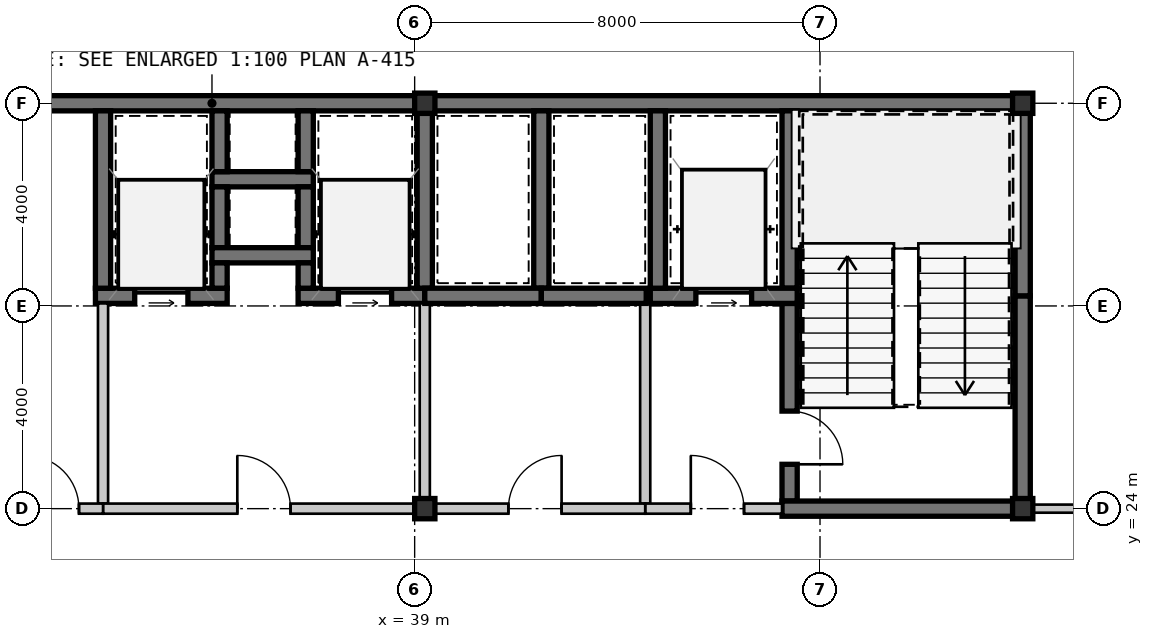
"""IFC4 building model, lengths in metres.
Left out: names, types, materials, properties, quantities, classifications, styles, units other than length and angle.
Written with IfcOpenShell. Run it as: python <this file> out.ifc"""

import sys

from ifc_helpers import new_model, si_unit, direction, frame, frame_2d, origin, origin_2d, place, context, subcontext, project, spatial, rectangle, hollow_rectangle, extrude, source, transform, mapped, element, fill, save


model = new_model("IFC4")
c1 = context("Model", 3, precision=1e-05, world=origin(), true_north=direction((0.0, 1.0)))
c2 = subcontext(c1, "Body", "Model", "MODEL_VIEW")
j1 = project(units=[si_unit("LENGTHUNIT", "METRE"), si_unit("PLANEANGLEUNIT", "RADIAN")], contexts=[c1])
p1 = place(None, origin())
s1 = spatial("IfcSite", under=j1, at=p1, CompositionType="ELEMENT")
p2 = place(p1, origin())
s2 = spatial("IfcBuilding", under=s1, at=p2, CompositionType="ELEMENT")
p3 = place(p2, frame((0.0, 0.0, 133.0)))
s3 = spatial("IfcBuildingStorey", under=s2, at=p3, CompositionType="ELEMENT", Elevation=133.0)
m1 = source(origin(), c2, "Body", "SweptSolid", [
    extrude(hollow_rectangle(XDim=0.4, YDim=0.4, WallThickness=0.016, at=origin_2d()), origin(), (0.0, 0.0, 1.0), 3.15),
])
for number, where, z_axis, x_axis in (
    (1, (39.2, 24.0, 0.0), (0.0, 0.0, 1.0), (1.0, 0.0, 0.0)),
    (2, (51.0, 24.0, 0.0), (0.0, 0.0, 1.0), (1.0, 0.0, 0.0)),
    (3, (39.2, 32.0, 0.0), (0.0, 0.0, 1.0), (1.0, 0.0, 0.0)),
    (4, (51.0, 32.0, 0.0), (0.0, 0.0, 1.0), (1.0, 0.0, 0.0)),
):
    element("IfcColumn", number, at=place(p3, frame(where, z_axis=z_axis, x_axis=x_axis)), inside=s3, PredefinedType="COLUMN", context=c2, shape_type="MappedRepresentation", body=[
        mapped(m1, transform((0.0, 0.0, 0.0), scale=1.0)),
    ])
m2 = source(origin(), c2, "Body", "SweptSolid", [
    extrude(rectangle(XDim=11.2, YDim=0.3, at=frame_2d((5.6, 0.0))), origin(), (0.0, 0.0, 1.0), 2.93),
])
p4 = place(p3, frame((28.0, 32.0, 0.0), z_axis=(0.0, 0.0, 1.0), x_axis=(1.0, 0.0, 0.0)))
e5 = element("IfcWall", 5, at=p4, inside=s3, PredefinedType="SHEAR", context=c2, shape_type="MappedRepresentation", body=[
    mapped(m2, transform((0.0, 0.0, 0.0), scale=1.0)),
])
m3 = source(origin(), c2, "Body", "SweptSolid", [
    extrude(rectangle(XDim=11.95, YDim=0.3, at=frame_2d((5.975, 0.0))), origin(), (0.0, 0.0, 1.0), 2.93),
])
p5 = place(p3, frame((39.2, 32.0, 0.0), z_axis=(0.0, 0.0, 1.0), x_axis=(1.0, 0.0, 0.0)))
e6 = element("IfcWall", 6, at=p5, inside=s3, PredefinedType="SHEAR", context=c2, shape_type="MappedRepresentation", body=[
    mapped(m3, transform((0.0, 0.0, 0.0), scale=1.0)),
])
m4 = source(origin(), c2, "Body", "SweptSolid", [
    extrude(rectangle(XDim=4.05, YDim=0.3, at=frame_2d((2.025, 0.0))), origin(), (0.0, 0.0, 1.0), 2.93),
])
p6 = place(p3, frame((51.0, 24.15, 0.0), z_axis=(0.0, 0.0, 1.0), x_axis=(0.0, 1.0, 0.0)))
e7 = element("IfcWall", 7, at=p6, inside=s3, PredefinedType="SHEAR", context=c2, shape_type="MappedRepresentation", body=[
    mapped(m4, transform((0.0, 0.0, 0.0), scale=1.0)),
])
m5 = source(origin(), c2, "Body", "SweptSolid", [
    extrude(rectangle(XDim=3.65, YDim=0.3, at=frame_2d((1.825, 0.0))), origin(), (0.0, 0.0, 1.0), 2.93),
])
p7 = place(p3, frame((51.0, 28.2, 0.0), z_axis=(0.0, 0.0, 1.0), x_axis=(0.0, 1.0, 0.0)))
e8 = element("IfcWall", 8, at=p7, inside=s3, PredefinedType="SHEAR", context=c2, shape_type="MappedRepresentation", body=[
    mapped(m5, transform((0.0, 0.0, 0.0), scale=1.0)),
])
m6 = source(origin(), c2, "Body", "SweptSolid", [
    extrude(rectangle(XDim=3.5, YDim=0.3, at=frame_2d((1.75, 0.0))), origin(), (0.0, 0.0, 1.0), 2.93),
])
p8 = place(p3, frame((46.4, 31.85, 0.0), z_axis=(0.0, 0.0, 1.0), x_axis=(0.0, -1.0, 0.0)))
e9 = element("IfcWall", 9, at=p8, inside=s3, PredefinedType="SHEAR", context=c2, shape_type="MappedRepresentation", body=[
    mapped(m6, transform((0.0, 0.0, 0.0), scale=1.0)),
])
m7 = source(origin(), c2, "Body", "SweptSolid", [
    extrude(rectangle(XDim=3.9, YDim=0.3, at=frame_2d((1.95, 0.0))), origin(), (0.0, 0.0, 1.0), 2.93),
])
p9 = place(p3, frame((46.4, 28.05, 0.0), z_axis=(0.0, 0.0, 1.0), x_axis=(0.0, -1.0, 0.0)))
e10 = element("IfcWall", 10, at=p9, inside=s3, PredefinedType="SHEAR", context=c2, shape_type="MappedRepresentation", body=[
    mapped(m7, transform((0.0, 0.0, 0.0), scale=1.0)),
])
m8 = source(origin(), c2, "Body", "SweptSolid", [
    extrude(rectangle(XDim=1.05, YDim=2.1, at=frame_2d((0.525, 1.05))), frame((0.0, 0.16, 0.0), z_axis=(0.0, -1.0, 0.0), x_axis=(1.0, 0.0, 0.0)), (0.0, 0.0, 1.0), 0.32),
])
p10 = place(p9, frame((2.125, 0.0, 0.0)))
e11 = element("IfcOpeningElement", 11, at=p10, cuts=e10, PredefinedType="OPENING", context=c2, shape_type="MappedRepresentation", body=[
    mapped(m8, transform((0.0, 0.0, 0.0), scale=1.0)),
])
m9 = source(origin(), c2, "Body", "SweptSolid", [
    extrude(rectangle(XDim=4.9, YDim=0.3, at=frame_2d((2.45, 0.0))), origin(), (0.0, 0.0, 1.0), 2.93),
])
p11 = place(p3, frame((46.25, 24.0, 0.0), z_axis=(0.0, 0.0, 1.0), x_axis=(1.0, 0.0, 0.0)))
e12 = element("IfcWall", 12, at=p11, inside=s3, PredefinedType="SHEAR", context=c2, shape_type="MappedRepresentation", body=[
    mapped(m9, transform((0.0, 0.0, 0.0), scale=1.0)),
])
m10 = source(origin(), c2, "Body", "SweptSolid", [
    extrude(rectangle(XDim=2.9, YDim=0.3, at=frame_2d((1.45, 0.0))), origin(), (0.0, 0.0, 1.0), 2.93),
])
p12 = place(p3, frame((43.65, 28.2, 0.0), z_axis=(0.0, 0.0, 1.0), x_axis=(1.0, 0.0, 0.0)))
e13 = element("IfcWall", 13, at=p12, inside=s3, PredefinedType="SHEAR", context=c2, shape_type="MappedRepresentation", body=[
    mapped(m10, transform((0.0, 0.0, 0.0), scale=1.0)),
])
m11 = source(origin(), c2, "Body", "SweptSolid", [
    extrude(rectangle(XDim=1.1, YDim=2.15, at=frame_2d((0.55, 1.075))), frame((0.0, 0.16, 0.0), z_axis=(0.0, -1.0, 0.0), x_axis=(1.0, 0.0, 0.0)), (0.0, 0.0, 1.0), 0.32),
])
p13 = place(p12, frame((0.9, 0.0, 0.0)))
e14 = element("IfcOpeningElement", 14, at=p13, cuts=e13, PredefinedType="OPENING", context=c2, shape_type="MappedRepresentation", body=[
    mapped(m11, transform((0.0, 0.0, 0.0), scale=1.0)),
])
p14 = place(p3, frame((43.8, 31.85, 0.0), z_axis=(0.0, 0.0, 1.0), x_axis=(0.0, -1.0, 0.0)))
e15 = element("IfcWall", 15, at=p14, inside=s3, PredefinedType="SHEAR", context=c2, shape_type="MappedRepresentation", body=[
    mapped(m6, transform((0.0, 0.0, 0.0), scale=1.0)),
])
m12 = source(origin(), c2, "Body", "SweptSolid", [
    extrude(rectangle(XDim=3.95, YDim=0.2, at=frame_2d((1.975, 0.0))), origin(), (0.0, 0.0, 1.0), 2.93),
])
p15 = place(p3, frame((43.55, 28.05, 0.0), z_axis=(0.0, 0.0, 1.0), x_axis=(0.0, -1.0, 0.0)))
e16 = element("IfcWall", 16, at=p15, inside=s3, PredefinedType="SOLIDWALL", context=c2, shape_type="MappedRepresentation", body=[
    mapped(m12, transform((0.0, 0.0, 0.0), scale=1.0)),
])
m13 = source(origin(), c2, "Body", "SweptSolid", [
    extrude(rectangle(XDim=2.7, YDim=0.2, at=frame_2d((1.35, 0.0))), origin(), (0.0, 0.0, 1.0), 2.397),
])
p16 = place(p3, frame((43.55, 24.0, 0.0), z_axis=(0.0, 0.0, 1.0), x_axis=(1.0, 0.0, 0.0)))
e17 = element("IfcWall", 17, at=p16, inside=s3, PredefinedType="SOLIDWALL", context=c2, shape_type="MappedRepresentation", body=[
    mapped(m13, transform((0.0, 0.0, 0.0), scale=1.0)),
])
m14 = source(origin(), c2, "Body", "SweptSolid", [
    extrude(rectangle(XDim=1.05, YDim=2.1, at=frame_2d((0.525, 1.05))), frame((0.0, 0.11, 0.0), z_axis=(0.0, -1.0, 0.0), x_axis=(1.0, 0.0, 0.0)), (0.0, 0.0, 1.0), 0.22),
])
p17 = place(p16, frame((0.9, 0.0, 0.0)))
e18 = element("IfcOpeningElement", 18, at=p17, cuts=e17, PredefinedType="OPENING", context=c2, shape_type="MappedRepresentation", body=[
    mapped(m14, transform((0.0, 0.0, 0.0), scale=1.0)),
])
m15 = source(origin(), c2, "Body", "SweptSolid", [
    extrude(rectangle(XDim=2.0, YDim=0.3, at=frame_2d((1.0, 0.0))), origin(), (0.0, 0.0, 1.0), 2.93),
])
p18 = place(p3, frame((35.0, 30.5, 0.0), z_axis=(0.0, 0.0, 1.0), x_axis=(1.0, 0.0, 0.0)))
e19 = element("IfcWall", 19, at=p18, inside=s3, PredefinedType="SHEAR", context=c2, shape_type="MappedRepresentation", body=[
    mapped(m15, transform((0.0, 0.0, 0.0), scale=1.0)),
])
m16 = source(origin(), c2, "Body", "SweptSolid", [
    extrude(rectangle(XDim=1.2, YDim=0.3, at=frame_2d((0.6, 0.0))), origin(), (0.0, 0.0, 1.0), 2.93),
])
for number, where, z_axis, x_axis in (
    (20, (35.15, 31.85, 0.0), (0.0, 0.0, 1.0), (0.0, -1.0, 0.0)),
    (21, (36.85, 30.65, 0.0), (0.0, 0.0, 1.0), (0.0, 1.0, 0.0)),
    (22, (35.15, 30.35, 0.0), (0.0, 0.0, 1.0), (0.0, -1.0, 0.0)),
    (23, (36.85, 29.15, 0.0), (0.0, 0.0, 1.0), (0.0, 1.0, 0.0)),
):
    element("IfcWall", number, at=place(p3, frame(where, z_axis=z_axis, x_axis=x_axis)), inside=s3, PredefinedType="SHEAR", context=c2, shape_type="MappedRepresentation", body=[
        mapped(m16, transform((0.0, 0.0, 0.0), scale=1.0)),
    ])
p19 = place(p3, frame((35.0, 29.0, 0.0), z_axis=(0.0, 0.0, 1.0), x_axis=(1.0, 0.0, 0.0)))
e24 = element("IfcWall", 24, at=p19, inside=s3, PredefinedType="SHEAR", context=c2, shape_type="MappedRepresentation", body=[
    mapped(m15, transform((0.0, 0.0, 0.0), scale=1.0)),
])
m17 = source(origin(), c2, "Body", "SweptSolid", [
    extrude(rectangle(XDim=2.6, YDim=0.3, at=frame_2d((1.3, 0.0))), origin(), (0.0, 0.0, 1.0), 2.93),
])
p20 = place(p3, frame((32.7, 28.2, 0.0), z_axis=(0.0, 0.0, 1.0), x_axis=(1.0, 0.0, 0.0)))
e25 = element("IfcWall", 25, at=p20, inside=s3, PredefinedType="SHEAR", context=c2, shape_type="MappedRepresentation", body=[
    mapped(m17, transform((0.0, 0.0, 0.0), scale=1.0)),
])
m18 = source(origin(), c2, "Body", "SweptSolid", [
    extrude(rectangle(XDim=1.05, YDim=2.15, at=frame_2d((0.525, 1.075))), frame((0.0, 0.16, 0.0), z_axis=(0.0, -1.0, 0.0), x_axis=(1.0, 0.0, 0.0)), (0.0, 0.0, 1.0), 0.32),
])
p21 = place(p20, frame((0.775, 0.0, 0.0)))
e26 = element("IfcOpeningElement", 26, at=p21, cuts=e25, PredefinedType="OPENING", context=c2, shape_type="MappedRepresentation", body=[
    mapped(m18, transform((0.0, 0.0, 0.0), scale=1.0)),
])
m19 = source(origin(), c2, "Body", "SweptSolid", [
    extrude(rectangle(XDim=0.5, YDim=0.3, at=frame_2d((0.25, 0.0))), origin(), (0.0, 0.0, 1.0), 2.93),
])
p22 = place(p3, frame((35.15, 28.35, 0.0), z_axis=(0.0, 0.0, 1.0), x_axis=(0.0, 1.0, 0.0)))
e27 = element("IfcWall", 27, at=p22, inside=s3, PredefinedType="SHEAR", context=c2, shape_type="MappedRepresentation", body=[
    mapped(m19, transform((0.0, 0.0, 0.0), scale=1.0)),
])
p23 = place(p3, frame((32.85, 31.85, 0.0), z_axis=(0.0, 0.0, 1.0), x_axis=(0.0, -1.0, 0.0)))
e28 = element("IfcWall", 28, at=p23, inside=s3, PredefinedType="SHEAR", context=c2, shape_type="MappedRepresentation", body=[
    mapped(m6, transform((0.0, 0.0, 0.0), scale=1.0)),
])
m20 = source(origin(), c2, "Body", "SweptSolid", [
    extrude(rectangle(XDim=2.5, YDim=0.3, at=frame_2d((1.25, 0.0))), origin(), (0.0, 0.0, 1.0), 2.93),
])
p24 = place(p3, frame((36.7, 28.2, 0.0), z_axis=(0.0, 0.0, 1.0), x_axis=(1.0, 0.0, 0.0)))
e29 = element("IfcWall", 29, at=p24, inside=s3, PredefinedType="SHEAR", context=c2, shape_type="MappedRepresentation", body=[
    mapped(m20, transform((0.0, 0.0, 0.0), scale=1.0)),
])
p25 = place(p24, frame((0.795, 0.0, 0.0)))
e30 = element("IfcOpeningElement", 30, at=p25, cuts=e29, PredefinedType="OPENING", context=c2, shape_type="MappedRepresentation", body=[
    mapped(m18, transform((0.0, 0.0, 0.0), scale=1.0)),
])
p26 = place(p3, frame((36.85, 28.85, 0.0), z_axis=(0.0, 0.0, 1.0), x_axis=(0.0, -1.0, 0.0)))
e31 = element("IfcWall", 31, at=p26, inside=s3, PredefinedType="SHEAR", context=c2, shape_type="MappedRepresentation", body=[
    mapped(m19, transform((0.0, 0.0, 0.0), scale=1.0)),
])
p27 = place(p3, frame((39.2, 28.35, 0.0), z_axis=(0.0, 0.0, 1.0), x_axis=(0.0, 1.0, 0.0)))
e32 = element("IfcWall", 32, at=p27, inside=s3, PredefinedType="SHEAR", context=c2, shape_type="MappedRepresentation", body=[
    mapped(m6, transform((0.0, 0.0, 0.0), scale=1.0)),
])
p28 = place(p3, frame((32.85, 24.1, 0.0), z_axis=(0.0, 0.0, 1.0), x_axis=(0.0, 1.0, 0.0)))
e33 = element("IfcWall", 33, at=p28, inside=s3, PredefinedType="SOLIDWALL", context=c2, shape_type="MappedRepresentation", body=[
    mapped(m12, transform((0.0, 0.0, 0.0), scale=1.0)),
])
m21 = source(origin(), c2, "Body", "SweptSolid", [
    extrude(rectangle(XDim=3.95, YDim=0.2, at=frame_2d((1.975, 0.0))), origin(), (0.0, 0.0, 1.0), 2.47),
])
p29 = place(p3, frame((39.2, 28.05, 0.0), z_axis=(0.0, 0.0, 1.0), x_axis=(0.0, -1.0, 0.0)))
e34 = element("IfcWall", 34, at=p29, inside=s3, PredefinedType="SOLIDWALL", context=c2, shape_type="MappedRepresentation", body=[
    mapped(m21, transform((0.0, 0.0, 0.0), scale=1.0)),
])
m22 = source(origin(), c2, "Body", "SweptSolid", [
    extrude(rectangle(XDim=6.35, YDim=0.2, at=frame_2d((3.175, 0.0))), origin(), (0.0, 0.0, 1.0), 2.47),
])
p30 = place(p3, frame((39.2, 24.0, 0.0), z_axis=(0.0, 0.0, 1.0), x_axis=(-1.0, 0.0, 0.0)))
e35 = element("IfcWall", 35, at=p30, inside=s3, PredefinedType="SOLIDWALL", context=c2, shape_type="MappedRepresentation", body=[
    mapped(m22, transform((0.0, 0.0, 0.0), scale=1.0)),
])
p31 = place(p30, frame((2.65, 0.0, 0.0)))
e36 = element("IfcOpeningElement", 36, at=p31, cuts=e35, PredefinedType="OPENING", context=c2, shape_type="MappedRepresentation", body=[
    mapped(m14, transform((0.0, 0.0, 0.0), scale=1.0)),
])
p32 = place(p3, frame((41.5, 28.35, 0.0), z_axis=(0.0, 0.0, 1.0), x_axis=(0.0, 1.0, 0.0)))
e37 = element("IfcWall", 37, at=p32, inside=s3, PredefinedType="SHEAR", context=c2, shape_type="MappedRepresentation", body=[
    mapped(m6, transform((0.0, 0.0, 0.0), scale=1.0)),
])
m23 = source(origin(), c2, "Body", "SweptSolid", [
    extrude(rectangle(XDim=2.3, YDim=0.3, at=frame_2d((1.15, 0.0))), origin(), (0.0, 0.0, 1.0), 2.93),
])
p33 = place(p3, frame((39.2, 28.2, 0.0), z_axis=(0.0, 0.0, 1.0), x_axis=(1.0, 0.0, 0.0)))
e38 = element("IfcWall", 38, at=p33, inside=s3, PredefinedType="SHEAR", context=c2, shape_type="MappedRepresentation", body=[
    mapped(m23, transform((0.0, 0.0, 0.0), scale=1.0)),
])
m24 = source(origin(), c2, "Body", "SweptSolid", [
    extrude(rectangle(XDim=2.07, YDim=0.3, at=frame_2d((1.035, 0.0))), origin(), (0.0, 0.0, 1.0), 2.93),
])
p34 = place(p3, frame((41.5, 28.2, 0.0), z_axis=(0.0, 0.0, 1.0), x_axis=(1.0, 0.0, 0.0)))
e39 = element("IfcWall", 39, at=p34, inside=s3, PredefinedType="SHEAR", context=c2, shape_type="MappedRepresentation", body=[
    mapped(m24, transform((0.0, 0.0, 0.0), scale=1.0)),
])
m25 = source(origin(), c2, "Body", "SweptSolid", [
    extrude(rectangle(XDim=2.0, YDim=0.2, at=frame_2d((1.0, 0.0))), origin(), (0.0, 0.0, 1.0), 2.47),
])
p35 = place(p3, frame((32.85, 24.0, 0.0), z_axis=(0.0, 0.0, 1.0), x_axis=(-1.0, 0.0, 0.0)))
e40 = element("IfcWall", 40, at=p35, inside=s3, PredefinedType="SOLIDWALL", context=c2, shape_type="MappedRepresentation", body=[
    mapped(m25, transform((0.0, 0.0, 0.0), scale=1.0)),
])
p36 = place(p35, frame((0.475, 0.0, 0.0)))
e41 = element("IfcOpeningElement", 41, at=p36, cuts=e40, PredefinedType="OPENING", context=c2, shape_type="MappedRepresentation", body=[
    mapped(m14, transform((0.0, 0.0, 0.0), scale=1.0)),
])
m26 = source(origin(), c2, "Body", "SweptSolid", [
    extrude(rectangle(XDim=4.35, YDim=0.2, at=frame_2d((2.175, 0.0))), origin(), (0.0, 0.0, 1.0), 2.397),
])
p37 = place(p3, frame((43.55, 24.0, 0.0), z_axis=(0.0, 0.0, 1.0), x_axis=(-1.0, 0.0, 0.0)))
e42 = element("IfcWall", 42, at=p37, inside=s3, PredefinedType="SOLIDWALL", context=c2, shape_type="MappedRepresentation", body=[
    mapped(m26, transform((0.0, 0.0, 0.0), scale=1.0)),
])
p38 = place(p37, frame((1.65, 0.0, 0.0)))
e43 = element("IfcOpeningElement", 43, at=p38, cuts=e42, PredefinedType="OPENING", context=c2, shape_type="MappedRepresentation", body=[
    mapped(m14, transform((0.0, 0.0, 0.0), scale=1.0)),
])
m27 = source(origin(), c2, "Body", "SweptSolid", [
    extrude(rectangle(XDim=10.1, YDim=0.16, at=frame_2d((5.05, 0.0))), origin(), (0.0, 0.0, 1.0), 2.93),
])
p39 = place(p3, frame((51.15, 24.0, 0.0), z_axis=(0.0, 0.0, 1.0), x_axis=(1.0, 0.0, 0.0)))
e44 = element("IfcWall", 44, at=p39, inside=s3, PredefinedType="PARTITIONING", context=c2, shape_type="MappedRepresentation", body=[
    mapped(m27, transform((0.0, 0.0, 0.0), scale=1.0)),
])
m28 = source(origin(), c2, "Body", "SweptSolid", [
    extrude(rectangle(XDim=0.92, YDim=2.1, at=frame_2d((0.46, 1.05))), frame((0.0, 0.09, 0.0), z_axis=(0.0, -1.0, 0.0), x_axis=(1.0, 0.0, 0.0)), (0.0, 0.0, 1.0), 0.18),
])
p40 = place(p39, frame((4.525, 0.0, 0.0)))
e45 = element("IfcOpeningElement", 45, at=p40, cuts=e44, PredefinedType="OPENING", context=c2, shape_type="MappedRepresentation", body=[
    mapped(m28, transform((0.0, 0.0, 0.0), scale=1.0)),
])
m29 = source(origin(), c2, "Body", "SweptSolid", [
    extrude(rectangle(XDim=1.05, YDim=2.1, at=frame_2d((0.525, 1.05))), frame((0.0, 0.025, 0.0), z_axis=(0.0, -1.0, 0.0), x_axis=(1.0, 0.0, 0.0)), (0.0, 0.0, 1.0), 0.05),
])
p41 = place(p10, origin())
e46 = element("IfcDoor", 46, at=p41, inside=s3, OperationType="SINGLE_SWING_RIGHT", PredefinedType="DOOR", context=c2, shape_type="MappedRepresentation", body=[
    mapped(m29, transform((0.0, 0.0, 0.0), scale=1.0)),
])
fill(e11, e46)
m30 = source(origin(), c2, "Body", "SweptSolid", [
    extrude(rectangle(XDim=1.1, YDim=2.15, at=frame_2d((0.55, 1.075))), frame((0.0, 0.025, 0.0), z_axis=(0.0, -1.0, 0.0), x_axis=(1.0, 0.0, 0.0)), (0.0, 0.0, 1.0), 0.05),
])
p42 = place(p13, origin())
e47 = element("IfcDoor", 47, at=p42, inside=s3, OperationType="SLIDING_TO_LEFT", PredefinedType="DOOR", context=c2, shape_type="MappedRepresentation", body=[
    mapped(m30, transform((0.0, 0.0, 0.0), scale=1.0)),
])
fill(e14, e47)
p43 = place(p17, origin())
e48 = element("IfcDoor", 48, at=p43, inside=s3, OperationType="SINGLE_SWING_LEFT", PredefinedType="DOOR", context=c2, shape_type="MappedRepresentation", body=[
    mapped(m29, transform((0.0, 0.0, 0.0), scale=1.0)),
])
fill(e18, e48)
m31 = source(origin(), c2, "Body", "SweptSolid", [
    extrude(rectangle(XDim=1.05, YDim=2.15, at=frame_2d((0.525, 1.075))), frame((0.0, 0.025, 0.0), z_axis=(0.0, -1.0, 0.0), x_axis=(1.0, 0.0, 0.0)), (0.0, 0.0, 1.0), 0.05),
])
p44 = place(p21, origin())
e49 = element("IfcDoor", 49, at=p44, inside=s3, OperationType="SLIDING_TO_LEFT", PredefinedType="DOOR", context=c2, shape_type="MappedRepresentation", body=[
    mapped(m31, transform((0.0, 0.0, 0.0), scale=1.0)),
])
fill(e26, e49)
p45 = place(p25, origin())
e50 = element("IfcDoor", 50, at=p45, inside=s3, OperationType="SLIDING_TO_LEFT", PredefinedType="DOOR", context=c2, shape_type="MappedRepresentation", body=[
    mapped(m31, transform((0.0, 0.0, 0.0), scale=1.0)),
])
fill(e30, e50)
p46 = place(p31, frame((1.05, 0.0, 0.0), z_axis=(0.0, 0.0, 1.0), x_axis=(-1.0, 0.0, 0.0)))
e51 = element("IfcDoor", 51, at=p46, inside=s3, OperationType="SINGLE_SWING_LEFT", PredefinedType="DOOR", context=c2, shape_type="MappedRepresentation", body=[
    mapped(m29, transform((0.0, 0.0, 0.0), scale=1.0)),
])
fill(e36, e51)
p47 = place(p36, frame((1.05, 0.0, 0.0), z_axis=(0.0, 0.0, 1.0), x_axis=(-1.0, 0.0, 0.0)))
e52 = element("IfcDoor", 52, at=p47, inside=s3, OperationType="SINGLE_SWING_LEFT", PredefinedType="DOOR", context=c2, shape_type="MappedRepresentation", body=[
    mapped(m29, transform((0.0, 0.0, 0.0), scale=1.0)),
])
fill(e41, e52)
p48 = place(p38, frame((1.05, 0.0, 0.0), z_axis=(0.0, 0.0, 1.0), x_axis=(-1.0, 0.0, 0.0)))
e53 = element("IfcDoor", 53, at=p48, inside=s3, OperationType="SINGLE_SWING_RIGHT", PredefinedType="DOOR", context=c2, shape_type="MappedRepresentation", body=[
    mapped(m29, transform((0.0, 0.0, 0.0), scale=1.0)),
])
fill(e43, e53)
save(model, sys.argv[1])
